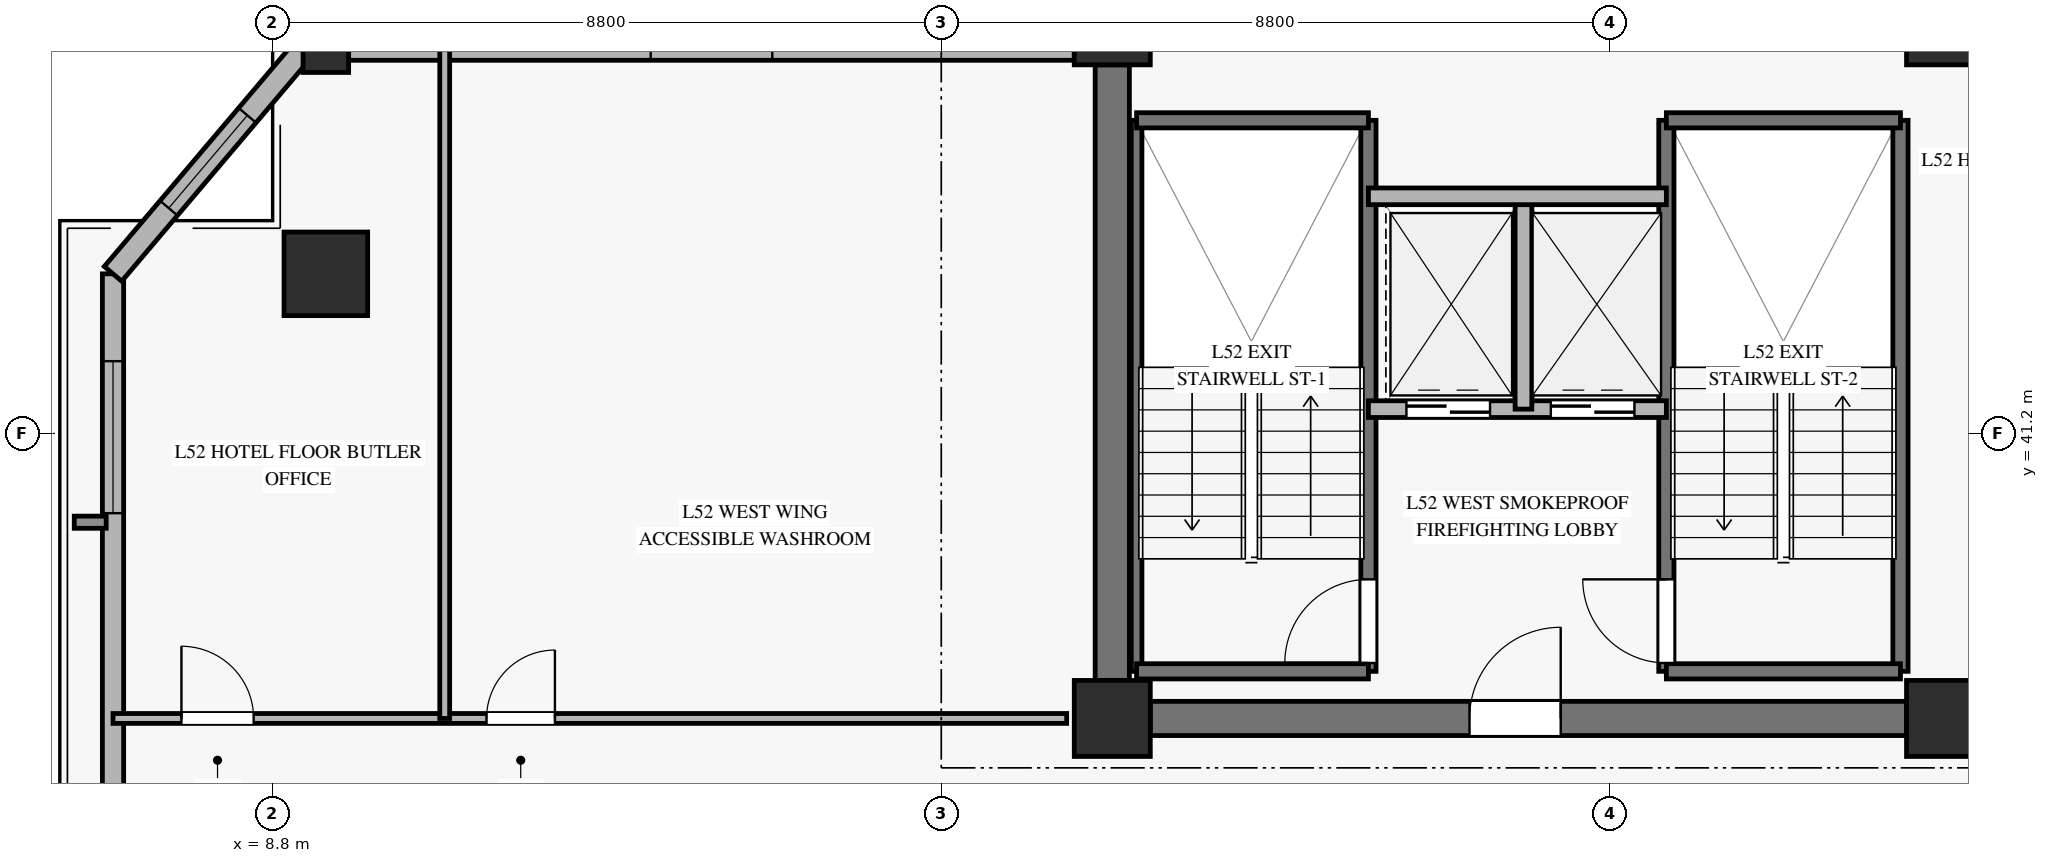
"""IFC4 building model, lengths in metres.
Left out: names, types, materials, properties, quantities, classifications, styles, units other than length and angle.
Written with IfcOpenShell. Run it as: python <this file> out.ifc"""

import sys

from ifc_helpers import new_model, si_unit, direction, frame, frame_2d, origin, origin_2d, place, context, subcontext, project, spatial, rectangle, hollow_rectangle, extrude, source, transform, mapped, element, fill, save


model = new_model("IFC4")
c1 = context("Model", 3, precision=1e-05, world=origin(), true_north=direction((0.0, 1.0)))
c2 = subcontext(c1, "Body", "Model", "MODEL_VIEW")
j1 = project(units=[si_unit("LENGTHUNIT", "METRE"), si_unit("PLANEANGLEUNIT", "RADIAN")], contexts=[c1])
p1 = place(None, origin())
s1 = spatial("IfcSite", under=j1, at=p1, CompositionType="ELEMENT")
p2 = place(p1, origin())
s2 = spatial("IfcBuilding", under=s1, at=p2, CompositionType="ELEMENT")
p3 = place(p2, frame((0.0, 0.0, 206.2)))
s3 = spatial("IfcBuildingStorey", under=s2, at=p3, CompositionType="ELEMENT", Elevation=206.2)
m1 = source(origin(), c2, "Body", "SweptSolid", [
    extrude(rectangle(XDim=1.0, YDim=1.0, at=origin_2d()), origin(), (0.0, 0.0, 1.0), 3.27),
])
for number, where, z_axis, x_axis in (
    (1, (19.85, 37.45, 0.0), (0.0, 0.0, 1.0), (1.0, 0.0, 0.0)),
    (2, (19.85, 46.55, 0.0), (0.0, 0.0, 1.0), (1.0, 0.0, 0.0)),
    (3, (30.8, 37.45, 0.0), (0.0, 0.0, 1.0), (1.0, 0.0, 0.0)),
    (4, (30.8, 46.55, 0.0), (0.0, 0.0, 1.0), (1.0, 0.0, 0.0)),
):
    element("IfcColumn", number, at=place(p3, frame(where, z_axis=z_axis, x_axis=x_axis)), inside=s3, PredefinedType="PILASTER", context=c2, shape_type="MappedRepresentation", body=[
        mapped(m1, transform((0.0, 0.0, 0.0), x_axis=(1.0, 0.0, 0.0), y_axis=(0.0, 1.0, 0.0), z_axis=(0.0, 0.0, 1.0), scale=1.0)),
    ])
p4 = place(p3, frame((20.35, 37.45, 0.0), z_axis=(0.0, 0.0, 1.0), x_axis=(1.0, 0.0, 0.0)))
e5 = element("IfcWall", 5, at=p4, inside=s3, PredefinedType="SHEAR", context=c2, shape_type="SweptSolid", body=[
    extrude(rectangle(XDim=9.95, YDim=0.45, at=frame_2d((4.975, 0.0))), origin(), (0.0, 0.0, 1.0), 3.27),
])
p5 = place(p4, frame((4.2, 0.0, 0.0)))
e6 = element("IfcOpeningElement", 6, at=p5, cuts=e5, PredefinedType="OPENING", context=c2, shape_type="SweptSolid", body=[
    extrude(rectangle(XDim=1.2, YDim=2.15, at=frame_2d((0.6, 1.075))), frame((0.0, 0.235, 0.0), z_axis=(0.0, -1.0, 0.0), x_axis=(1.0, 0.0, 0.0)), (0.0, 0.0, 1.0), 0.47),
])
p6 = place(p3, frame((19.85, 37.95, 0.0), z_axis=(0.0, 0.0, 1.0), x_axis=(0.0, 1.0, 0.0)))
e7 = element("IfcWall", 7, at=p6, inside=s3, PredefinedType="SHEAR", context=c2, shape_type="SweptSolid", body=[
    extrude(rectangle(XDim=8.1, YDim=0.45, at=frame_2d((4.05, 0.0))), origin(), (0.0, 0.0, 1.0), 3.27),
])
m2 = source(origin(), c2, "Body", "SweptSolid", [
    extrude(hollow_rectangle(XDim=1.1, YDim=1.1, WallThickness=0.05, at=origin_2d()), origin(), (0.0, 0.0, 1.0), 3.27),
])
p7 = place(p3, frame((9.503, 43.3, 0.0), z_axis=(0.0, 0.0, 1.0), x_axis=(1.0, 0.0, 0.0)))
e8 = element("IfcColumn", 8, at=p7, inside=s3, PredefinedType="COLUMN", context=c2, shape_type="MappedRepresentation", body=[
    mapped(m2, transform((0.0, 0.0, 0.0), x_axis=(1.0, 0.0, 0.0), y_axis=(0.0, 1.0, 0.0), z_axis=(0.0, 0.0, 1.0), scale=1.0)),
])
m3 = source(origin(), c2, "Body", "SweptSolid", [
    extrude(hollow_rectangle(XDim=0.6, YDim=0.6, WallThickness=0.028, at=origin_2d()), origin(), (0.0, 0.0, 1.0), 3.27),
])
p8 = place(p3, frame((9.503, 46.25, 0.0), z_axis=(0.0, 0.0, 1.0), x_axis=(1.0, 0.0, 0.0)))
e9 = element("IfcColumn", 9, at=p8, inside=s3, PredefinedType="COLUMN", context=c2, shape_type="MappedRepresentation", body=[
    mapped(m3, transform((0.0, 0.0, 0.0), x_axis=(1.0, 0.0, 0.0), y_axis=(0.0, 1.0, 0.0), z_axis=(0.0, 0.0, 1.0), scale=1.0)),
])
p9 = place(p3, frame((6.703, 29.043, 0.0), z_axis=(0.0, 0.0, 1.0), x_axis=(0.0, 1.0, 0.0)))
e10 = element("IfcWall", 10, at=p9, inside=s3, PredefinedType="SOLIDWALL", context=c2, shape_type="SweptSolid", body=[
    extrude(rectangle(XDim=14.257, YDim=0.28, at=frame_2d((7.128, 0.0))), origin(), (0.0, 0.0, 1.0), 2.75),
])
p10 = place(p9, frame((1.232, 0.0, 0.45)))
e11 = element("IfcOpeningElement", 11, at=p10, cuts=e10, PredefinedType="OPENING", context=c2, shape_type="SweptSolid", body=[
    extrude(rectangle(XDim=2.0, YDim=2.0, at=frame_2d((1.0, 1.0))), frame((0.0, 0.15, 0.0), z_axis=(0.0, -1.0, 0.0), x_axis=(1.0, 0.0, 0.0)), (0.0, 0.0, 1.0), 0.3),
])
p11 = place(p9, frame((11.108, 0.0, 0.45)))
e12 = element("IfcOpeningElement", 12, at=p11, cuts=e10, PredefinedType="OPENING", context=c2, shape_type="SweptSolid", body=[
    extrude(rectangle(XDim=2.0, YDim=2.0, at=frame_2d((1.0, 1.0))), frame((0.0, 0.15, 0.0), z_axis=(0.0, -1.0, 0.0), x_axis=(1.0, 0.0, 0.0)), (0.0, 0.0, 1.0), 0.3),
])
p12 = place(p3, frame((9.803, 46.25, 0.0), z_axis=(0.0, 0.0, 1.0), x_axis=(1.0, 0.0, 0.0)))
e13 = element("IfcWall", 13, at=p12, inside=s3, PredefinedType="SOLIDWALL", context=c2, shape_type="SweptSolid", body=[
    extrude(rectangle(XDim=9.547, YDim=0.28, at=frame_2d((4.773, 0.0))), origin(), (0.0, 0.0, 1.0), 2.75),
])
p13 = place(p12, frame((3.974, 0.0, 0.45)))
e14 = element("IfcOpeningElement", 14, at=p13, cuts=e13, PredefinedType="OPENING", context=c2, shape_type="SweptSolid", body=[
    extrude(rectangle(XDim=1.6, YDim=2.0, at=frame_2d((0.8, 1.0))), frame((0.0, 0.15, 0.0), z_axis=(0.0, -1.0, 0.0), x_axis=(1.0, 0.0, 0.0)), (0.0, 0.0, 1.0), 0.3),
])
p14 = place(p3, frame((9.203, 46.25, 0.0), z_axis=(0.0, 0.0, 1.0), x_axis=(-0.646527923623, -0.762890322377, 0.0)))
e15 = element("IfcWall", 15, at=p14, inside=s3, PredefinedType="SOLIDWALL", context=c2, shape_type="SweptSolid", body=[
    extrude(rectangle(XDim=3.867, YDim=0.3, at=frame_2d((1.933, 0.0))), origin(), (0.0, 0.0, 1.0), 2.75),
])
p15 = place(p14, frame((1.133, 0.0, 0.45)))
e16 = element("IfcOpeningElement", 16, at=p15, cuts=e15, PredefinedType="OPENING", context=c2, shape_type="SweptSolid", body=[
    extrude(rectangle(XDim=1.6, YDim=2.0, at=frame_2d((0.8, 1.0))), frame((0.0, 0.16, 0.0), z_axis=(0.0, -1.0, 0.0), x_axis=(1.0, 0.0, 0.0)), (0.0, 0.0, 1.0), 0.32),
])
p16 = place(p3, frame((20.17, 38.07, 0.0), z_axis=(0.0, 0.0, 1.0), x_axis=(0.0, 1.0, 0.0)))
e17 = element("IfcWall", 17, at=p16, inside=s3, PredefinedType="SOLIDWALL", context=c2, shape_type="SweptSolid", body=[
    extrude(rectangle(XDim=7.25, YDim=0.14, at=frame_2d((3.625, 0.0))), origin(), (0.0, 0.0, 1.0), 3.5),
])
p17 = place(p3, frame((23.22, 38.07, 0.0), z_axis=(0.0, 0.0, 1.0), x_axis=(0.0, 1.0, 0.0)))
e18 = element("IfcWall", 18, at=p17, inside=s3, PredefinedType="SOLIDWALL", context=c2, shape_type="SweptSolid", body=[
    extrude(rectangle(XDim=7.25, YDim=0.2, at=frame_2d((3.625, 0.0))), origin(), (0.0, 0.0, 1.0), 3.5),
])
p18 = place(p17, frame((0.11, 0.0, 0.0)))
e19 = element("IfcOpeningElement", 19, at=p18, cuts=e18, PredefinedType="OPENING", context=c2, shape_type="SweptSolid", body=[
    extrude(rectangle(XDim=1.1, YDim=2.15, at=frame_2d((0.55, 1.075))), frame((0.0, 0.11, 0.0), z_axis=(0.0, -1.0, 0.0), x_axis=(1.0, 0.0, 0.0)), (0.0, 0.0, 1.0), 0.22),
])
for number, where, z_axis, x_axis in (
    (20, (20.17, 45.32, 0.0), (0.0, 0.0, 1.0), (1.0, 0.0, 0.0)),
    (21, (20.17, 38.07, 0.0), (0.0, 0.0, 1.0), (1.0, 0.0, 0.0)),
):
    element("IfcWall", number, at=place(p3, frame(where, z_axis=z_axis, x_axis=x_axis)), inside=s3, PredefinedType="SOLIDWALL", context=c2, shape_type="SweptSolid", body=[
        extrude(rectangle(XDim=3.05, YDim=0.2, at=frame_2d((1.525, 0.0))), origin(), (0.0, 0.0, 1.0), 3.5),
    ])
p19 = place(p3, frame((27.14, 38.07, 0.0), z_axis=(0.0, 0.0, 1.0), x_axis=(0.0, 1.0, 0.0)))
e22 = element("IfcWall", 22, at=p19, inside=s3, PredefinedType="SOLIDWALL", context=c2, shape_type="SweptSolid", body=[
    extrude(rectangle(XDim=7.25, YDim=0.2, at=frame_2d((3.625, 0.0))), origin(), (0.0, 0.0, 1.0), 3.5),
])
p20 = place(p19, frame((0.11, 0.0, 0.0)))
e23 = element("IfcOpeningElement", 23, at=p20, cuts=e22, PredefinedType="OPENING", context=c2, shape_type="SweptSolid", body=[
    extrude(rectangle(XDim=1.1, YDim=2.15, at=frame_2d((0.55, 1.075))), frame((0.0, 0.11, 0.0), z_axis=(0.0, -1.0, 0.0), x_axis=(1.0, 0.0, 0.0)), (0.0, 0.0, 1.0), 0.22),
])
p21 = place(p3, frame((30.22, 38.07, 0.0), z_axis=(0.0, 0.0, 1.0), x_axis=(0.0, 1.0, 0.0)))
e24 = element("IfcWall", 24, at=p21, inside=s3, PredefinedType="SOLIDWALL", context=c2, shape_type="SweptSolid", body=[
    extrude(rectangle(XDim=7.25, YDim=0.2, at=frame_2d((3.625, 0.0))), origin(), (0.0, 0.0, 1.0), 3.5),
])
for number, where, z_axis, x_axis in (
    (25, (27.14, 45.32, 0.0), (0.0, 0.0, 1.0), (1.0, 0.0, 0.0)),
    (26, (27.14, 38.07, 0.0), (0.0, 0.0, 1.0), (1.0, 0.0, 0.0)),
):
    element("IfcWall", number, at=place(p3, frame(where, z_axis=z_axis, x_axis=x_axis)), inside=s3, PredefinedType="SOLIDWALL", context=c2, shape_type="SweptSolid", body=[
        extrude(rectangle(XDim=3.08, YDim=0.2, at=frame_2d((1.54, 0.0))), origin(), (0.0, 0.0, 1.0), 3.5),
    ])
p22 = place(p3, frame((23.22, 41.52, 0.0), z_axis=(0.0, 0.0, 1.0), x_axis=(1.0, 0.0, 0.0)))
e27 = element("IfcWall", 27, at=p22, inside=s3, PredefinedType="SOLIDWALL", context=c2, shape_type="SweptSolid", body=[
    extrude(rectangle(XDim=3.92, YDim=0.22, at=frame_2d((1.96, 0.0))), origin(), (0.0, 0.0, 1.0), 3.27),
])
p23 = place(p22, frame((0.5, 0.0, 0.0)))
e28 = element("IfcOpeningElement", 28, at=p23, cuts=e27, PredefinedType="OPENING", context=c2, shape_type="SweptSolid", body=[
    extrude(rectangle(XDim=1.1, YDim=2.2, at=frame_2d((0.55, 1.1))), frame((0.0, 0.12, 0.0), z_axis=(0.0, -1.0, 0.0), x_axis=(1.0, 0.0, 0.0)), (0.0, 0.0, 1.0), 0.24),
])
p24 = place(p22, frame((2.4, 0.0, 0.0)))
e29 = element("IfcOpeningElement", 29, at=p24, cuts=e27, PredefinedType="OPENING", context=c2, shape_type="SweptSolid", body=[
    extrude(rectangle(XDim=1.1, YDim=2.2, at=frame_2d((0.55, 1.1))), frame((0.0, 0.12, 0.0), z_axis=(0.0, -1.0, 0.0), x_axis=(1.0, 0.0, 0.0)), (0.0, 0.0, 1.0), 0.24),
])
p25 = place(p3, frame((25.26, 41.52, 0.0), z_axis=(0.0, 0.0, 1.0), x_axis=(0.0, 1.0, 0.0)))
e30 = element("IfcWall", 30, at=p25, inside=s3, PredefinedType="SOLIDWALL", context=c2, shape_type="SweptSolid", body=[
    extrude(rectangle(XDim=2.8, YDim=0.22, at=frame_2d((1.4, 0.0))), origin(), (0.0, 0.0, 1.0), 3.27),
])
p26 = place(p3, frame((23.22, 44.32, 0.0), z_axis=(0.0, 0.0, 1.0), x_axis=(1.0, 0.0, 0.0)))
e31 = element("IfcWall", 31, at=p26, inside=s3, PredefinedType="SOLIDWALL", context=c2, shape_type="SweptSolid", body=[
    extrude(rectangle(XDim=3.92, YDim=0.22, at=frame_2d((1.96, 0.0))), origin(), (0.0, 0.0, 1.0), 3.27),
])
p27 = place(p3, frame((6.703, 37.45, 0.0), z_axis=(0.0, 0.0, 1.0), x_axis=(1.0, 0.0, 0.0)))
e32 = element("IfcWall", 32, at=p27, inside=s3, PredefinedType="PARTITIONING", context=c2, shape_type="SweptSolid", body=[
    extrude(rectangle(XDim=12.547, YDim=0.13, at=frame_2d((6.273, 0.0))), origin(), (0.0, 0.0, 1.0), 2.755),
])
p28 = place(p27, frame((0.9, 0.0, 0.0)))
e33 = element("IfcOpeningElement", 33, at=p28, cuts=e32, PredefinedType="OPENING", context=c2, shape_type="SweptSolid", body=[
    extrude(rectangle(XDim=0.95, YDim=2.1, at=frame_2d((0.475, 1.05))), frame((0.0, 0.075, 0.0), z_axis=(0.0, -1.0, 0.0), x_axis=(1.0, 0.0, 0.0)), (0.0, 0.0, 1.0), 0.15),
])
p29 = place(p27, frame((4.914, 0.0, 0.0)))
e34 = element("IfcOpeningElement", 34, at=p29, cuts=e32, PredefinedType="OPENING", context=c2, shape_type="SweptSolid", body=[
    extrude(rectangle(XDim=0.9, YDim=2.1, at=frame_2d((0.45, 1.05))), frame((0.0, 0.075, 0.0), z_axis=(0.0, -1.0, 0.0), x_axis=(1.0, 0.0, 0.0)), (0.0, 0.0, 1.0), 0.15),
])
p30 = place(p3, frame((11.067, 37.45, 0.0), z_axis=(0.0, 0.0, 1.0), x_axis=(0.0, 1.0, 0.0)))
e35 = element("IfcWall", 35, at=p30, inside=s3, PredefinedType="PARTITIONING", context=c2, shape_type="SweptSolid", body=[
    extrude(rectangle(XDim=8.8, YDim=0.13, at=frame_2d((4.4, 0.0))), origin(), (0.0, 0.0, 1.0), 3.27),
])
m4 = source(origin(), c2, "Body", "SweptSolid", [
    extrude(rectangle(XDim=2.0, YDim=2.0, at=frame_2d((1.0, 1.0))), frame((0.0, 0.03, 0.0), z_axis=(0.0, -1.0, 0.0), x_axis=(1.0, 0.0, 0.0)), (0.0, 0.0, 1.0), 0.06),
])
p31 = place(p11, origin())
e36 = element("IfcWindow", 36, at=p31, inside=s3, PartitioningType="SINGLE_PANEL", PredefinedType="WINDOW", context=c2, shape_type="MappedRepresentation", body=[
    mapped(m4, transform((0.0, 0.0, 0.0), x_axis=(1.0, 0.0, 0.0), y_axis=(0.0, 1.0, 0.0), z_axis=(0.0, 0.0, 1.0), scale=1.0)),
])
fill(e12, e36)
m5 = source(origin(), c2, "Body", "SweptSolid", [
    extrude(rectangle(XDim=1.6, YDim=2.0, at=frame_2d((0.8, 1.0))), frame((0.0, 0.03, 0.0), z_axis=(0.0, -1.0, 0.0), x_axis=(1.0, 0.0, 0.0)), (0.0, 0.0, 1.0), 0.06),
])
p32 = place(p15, origin())
e37 = element("IfcWindow", 37, at=p32, inside=s3, PartitioningType="SINGLE_PANEL", PredefinedType="WINDOW", context=c2, shape_type="MappedRepresentation", body=[
    mapped(m5, transform((0.0, 0.0, 0.0), x_axis=(1.0, 0.0, 0.0), y_axis=(0.0, 1.0, 0.0), z_axis=(0.0, 0.0, 1.0), scale=1.0)),
])
fill(e16, e37)
m6 = source(origin(), c2, "Body", "SweptSolid", [
    extrude(rectangle(XDim=1.1, YDim=2.15, at=frame_2d((0.55, 1.075))), frame((0.0, 0.025, 0.0), z_axis=(0.0, -1.0, 0.0), x_axis=(1.0, 0.0, 0.0)), (0.0, 0.0, 1.0), 0.05),
])
p33 = place(p18, origin())
e38 = element("IfcDoor", 38, at=p33, inside=s3, OperationType="SINGLE_SWING_LEFT", PredefinedType="DOOR", context=c2, shape_type="MappedRepresentation", body=[
    mapped(m6, transform((0.0, 0.0, 0.0), x_axis=(1.0, 0.0, 0.0), y_axis=(0.0, 1.0, 0.0), z_axis=(0.0, 0.0, 1.0), scale=1.0)),
])
fill(e19, e38)
p34 = place(p20, origin())
e39 = element("IfcDoor", 39, at=p34, inside=s3, OperationType="SINGLE_SWING_RIGHT", PredefinedType="DOOR", context=c2, shape_type="MappedRepresentation", body=[
    mapped(m6, transform((0.0, 0.0, 0.0), x_axis=(1.0, 0.0, 0.0), y_axis=(0.0, 1.0, 0.0), z_axis=(0.0, 0.0, 1.0), scale=1.0)),
])
fill(e23, e39)
m7 = source(origin(), c2, "Body", "SweptSolid", [
    extrude(rectangle(XDim=1.1, YDim=2.2, at=frame_2d((0.55, 1.1))), frame((0.0, 0.025, 0.0), z_axis=(0.0, -1.0, 0.0), x_axis=(1.0, 0.0, 0.0)), (0.0, 0.0, 1.0), 0.05),
])
p35 = place(p23, origin())
e40 = element("IfcDoor", 40, at=p35, inside=s3, OperationType="SLIDING_TO_LEFT", PredefinedType="DOOR", context=c2, shape_type="MappedRepresentation", body=[
    mapped(m7, transform((0.0, 0.0, 0.0), x_axis=(1.0, 0.0, 0.0), y_axis=(0.0, 1.0, 0.0), z_axis=(0.0, 0.0, 1.0), scale=1.0)),
])
fill(e28, e40)
p36 = place(p24, origin())
e41 = element("IfcDoor", 41, at=p36, inside=s3, OperationType="SLIDING_TO_LEFT", PredefinedType="DOOR", context=c2, shape_type="MappedRepresentation", body=[
    mapped(m7, transform((0.0, 0.0, 0.0), x_axis=(1.0, 0.0, 0.0), y_axis=(0.0, 1.0, 0.0), z_axis=(0.0, 0.0, 1.0), scale=1.0)),
])
fill(e29, e41)
m8 = source(origin(), c2, "Body", "SweptSolid", [
    extrude(rectangle(XDim=1.2, YDim=2.15, at=frame_2d((0.6, 1.075))), frame((0.0, 0.025, 0.0), z_axis=(0.0, -1.0, 0.0), x_axis=(1.0, 0.0, 0.0)), (0.0, 0.0, 1.0), 0.05),
])
p37 = place(p5, origin())
e42 = element("IfcDoor", 42, at=p37, inside=s3, OperationType="SINGLE_SWING_RIGHT", PredefinedType="DOOR", context=c2, shape_type="MappedRepresentation", body=[
    mapped(m8, transform((0.0, 0.0, 0.0), x_axis=(1.0, 0.0, 0.0), y_axis=(0.0, 1.0, 0.0), z_axis=(0.0, 0.0, 1.0), scale=1.0)),
])
fill(e6, e42)
m9 = source(origin(), c2, "Body", "SweptSolid", [
    extrude(rectangle(XDim=0.95, YDim=2.1, at=frame_2d((0.475, 1.05))), frame((0.0, 0.025, 0.0), z_axis=(0.0, -1.0, 0.0), x_axis=(1.0, 0.0, 0.0)), (0.0, 0.0, 1.0), 0.05),
])
p38 = place(p28, origin())
e43 = element("IfcDoor", 43, at=p38, inside=s3, OperationType="SINGLE_SWING_LEFT", PredefinedType="DOOR", context=c2, shape_type="MappedRepresentation", body=[
    mapped(m9, transform((0.0, 0.0, 0.0), x_axis=(1.0, 0.0, 0.0), y_axis=(0.0, 1.0, 0.0), z_axis=(0.0, 0.0, 1.0), scale=1.0)),
])
fill(e33, e43)
m10 = source(origin(), c2, "Body", "SweptSolid", [
    extrude(rectangle(XDim=0.9, YDim=2.1, at=frame_2d((0.45, 1.05))), frame((0.0, 0.025, 0.0), z_axis=(0.0, -1.0, 0.0), x_axis=(1.0, 0.0, 0.0)), (0.0, 0.0, 1.0), 0.05),
])
p39 = place(p29, origin())
e44 = element("IfcDoor", 44, at=p39, inside=s3, OperationType="SINGLE_SWING_RIGHT", PredefinedType="DOOR", context=c2, shape_type="MappedRepresentation", body=[
    mapped(m10, transform((0.0, 0.0, 0.0), x_axis=(1.0, 0.0, 0.0), y_axis=(0.0, 1.0, 0.0), z_axis=(0.0, 0.0, 1.0), scale=1.0)),
])
fill(e34, e44)
save(model, sys.argv[1])
